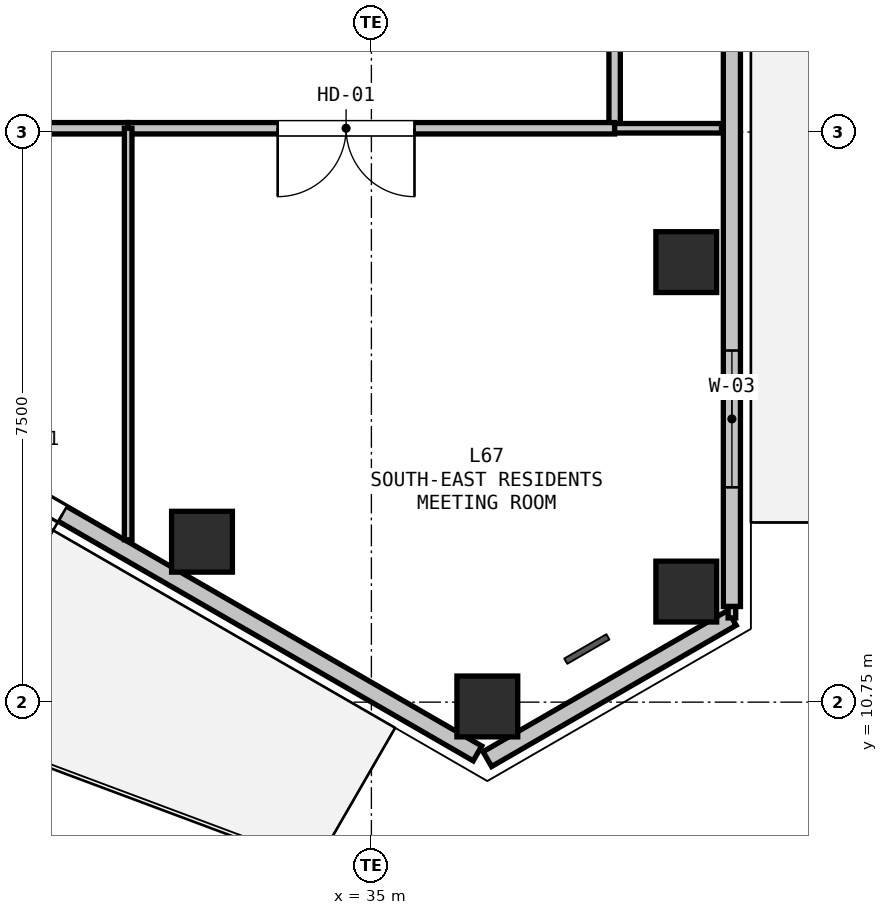
"""IFC4 building model, lengths in metres.
Left out: names, types, materials, properties, quantities, classifications, styles, units other than length and angle.
Written with IfcOpenShell. Run it as: python <this file> out.ifc"""

import sys

from ifc_helpers import new_model, si_unit, direction, frame, frame_2d, origin, origin_2d, place, context, subcontext, project, spatial, rectangle, hollow_rectangle, extrude, element, fill, save


model = new_model("IFC4")
c1 = context("Model", 3, precision=1e-05, world=origin(), true_north=direction((0.0, 1.0)))
c2 = subcontext(c1, "Body", "Model", "MODEL_VIEW")
j1 = project(units=[si_unit("LENGTHUNIT", "METRE"), si_unit("PLANEANGLEUNIT", "RADIAN")], contexts=[c1])
p1 = place(None, origin())
s1 = spatial("IfcSite", under=j1, at=p1, CompositionType="ELEMENT")
p2 = place(p1, origin())
s2 = spatial("IfcBuilding", under=s1, at=p2, CompositionType="ELEMENT")
p3 = place(p2, frame((0.0, 0.0, 239.7)))
s3 = spatial("IfcBuildingStorey", under=s2, at=p3, CompositionType="ELEMENT", Elevation=239.7)
for number, where, z_axis, x_axis in (
    (1, (39.143, 16.539, 0.0), (0.0, 0.0, 1.0), (1.0, 0.0, 0.0)),
    (2, (39.143, 12.205, 0.0), (0.0, 0.0, 1.0), (1.0, 0.0, 0.0)),
    (3, (36.525, 10.693, 0.0), (0.0, 0.0, 1.0), (1.0, 0.0, 0.0)),
    (4, (32.771, 12.861, 0.0), (0.0, 0.0, 1.0), (1.0, 0.0, 0.0)),
):
    element("IfcColumn", number, at=place(p3, frame(where, z_axis=z_axis, x_axis=x_axis)), inside=s3, PredefinedType="COLUMN", context=c2, shape_type="SweptSolid", body=[
        extrude(hollow_rectangle(XDim=0.8, YDim=0.8, WallThickness=0.025, at=origin_2d()), origin(), (0.0, 0.0, 1.0), 3.3),
    ])
p4 = place(p3, frame((39.743, 11.858, 0.0), z_axis=(0.0, 0.0, 1.0), x_axis=(-0.866038962515, -0.499976514854, 0.0)))
e5 = element("IfcWall", 5, at=p4, inside=s3, PredefinedType="SOLIDWALL", context=c2, shape_type="SweptSolid", body=[
    extrude(rectangle(XDim=3.716, YDim=0.225, at=frame_2d((1.858, 0.0))), origin(), (0.0, 0.0, 1.0), 2.7),
])
p5 = place(p3, frame((39.743, 20.936, 0.0), z_axis=(0.0, 0.0, 1.0), x_axis=(0.0, -1.0, 0.0)))
e6 = element("IfcWall", 6, at=p5, inside=s3, PredefinedType="SOLIDWALL", context=c2, shape_type="SweptSolid", body=[
    extrude(rectangle(XDim=8.928, YDim=0.225, at=frame_2d((4.464, 0.0))), origin(), (0.0, 0.0, 1.0), 2.7),
])
p6 = place(p5, frame((5.56, 0.0, 0.9)))
e7 = element("IfcOpeningElement", 7, at=p6, cuts=e6, PredefinedType="OPENING", context=c2, shape_type="SweptSolid", body=[
    extrude(rectangle(XDim=1.8, YDim=1.5, at=frame_2d((0.9, 0.75))), frame((0.0, 0.123, 0.0), z_axis=(0.0, -1.0, 0.0), x_axis=(1.0, 0.0, 0.0)), (0.0, 0.0, 1.0), 0.245),
])
p7 = place(p3, frame((36.395, 10.076, 0.0), z_axis=(0.0, 0.0, 1.0), x_axis=(-0.866026655105, 0.499997832642, 0.0)))
e8 = element("IfcWall", 8, at=p7, inside=s3, PredefinedType="SOLIDWALL", context=c2, shape_type="SweptSolid", body=[
    extrude(rectangle(XDim=8.928, YDim=0.225, at=frame_2d((4.464, 0.0))), origin(), (0.0, 0.0, 1.0), 2.7),
])
p8 = place(p7, frame((6.302, 0.0, 0.0)))
e9 = element("IfcOpeningElement", 9, at=p8, cuts=e8, PredefinedType="OPENING", context=c2, shape_type="SweptSolid", body=[
    extrude(rectangle(XDim=1.0, YDim=2.1, at=frame_2d((0.5, 1.05))), frame((0.0, 0.123, 0.0), z_axis=(0.0, -1.0, 0.0), x_axis=(1.0, 0.0, 0.0)), (0.0, 0.0, 1.0), 0.245),
])
p9 = place(p3, frame((38.2, 19.9, 0.0), z_axis=(0.0, 0.0, 1.0), x_axis=(0.0, -1.0, 0.0)))
e10 = element("IfcWall", 10, at=p9, inside=s3, PredefinedType="PARTITIONING", context=c2, shape_type="SweptSolid", body=[
    extrude(rectangle(XDim=1.6, YDim=0.15, at=frame_2d((0.8, 0.0))), origin(), (0.0, 0.0, 1.0), 3.08),
])
p10 = place(p3, frame((38.2, 18.3, 0.0), z_axis=(0.0, 0.0, 1.0), x_axis=(-1.0, 0.0, 0.0)))
e11 = element("IfcWall", 11, at=p10, inside=s3, PredefinedType="PARTITIONING", context=c2, shape_type="SweptSolid", body=[
    extrude(rectangle(XDim=6.4, YDim=0.15, at=frame_2d((3.2, 0.0))), origin(), (0.0, 0.0, 1.0), 2.528),
])
p11 = place(p10, frame((2.633, 0.0, 0.0)))
e12 = element("IfcOpeningElement", 12, at=p11, cuts=e11, PredefinedType="OPENING", context=c2, shape_type="SweptSolid", body=[
    extrude(rectangle(XDim=1.8, YDim=2.2, at=frame_2d((0.9, 1.1))), frame((0.0, 0.085, 0.0), z_axis=(0.0, -1.0, 0.0), x_axis=(1.0, 0.0, 0.0)), (0.0, 0.0, 1.0), 0.17),
])
p12 = place(p3, frame((31.8, 18.3, 0.0), z_axis=(0.0, 0.0, 1.0), x_axis=(-1.0, 0.0, 0.0)))
e13 = element("IfcWall", 13, at=p12, inside=s3, PredefinedType="PARTITIONING", context=c2, shape_type="SweptSolid", body=[
    extrude(rectangle(XDim=3.2, YDim=0.15, at=frame_2d((1.6, 0.0))), origin(), (0.0, 0.0, 1.0), 3.08),
])
p13 = place(p12, frame((1.1, 0.0, 0.0)))
e14 = element("IfcOpeningElement", 14, at=p13, cuts=e13, PredefinedType="OPENING", context=c2, shape_type="SweptSolid", body=[
    extrude(rectangle(XDim=1.0, YDim=2.15, at=frame_2d((0.5, 1.075))), frame((0.0, 0.085, 0.0), z_axis=(0.0, -1.0, 0.0), x_axis=(1.0, 0.0, 0.0)), (0.0, 0.0, 1.0), 0.17),
])
p14 = place(p3, frame((31.8, 12.886, 0.0), z_axis=(0.0, 0.0, 1.0), x_axis=(0.0, 1.0, 0.0)))
e15 = element("IfcWall", 15, at=p14, inside=s3, PredefinedType="PARTITIONING", context=c2, shape_type="SweptSolid", body=[
    extrude(rectangle(XDim=5.414, YDim=0.1, at=frame_2d((2.707, 0.0))), origin(), (0.0, 0.0, 1.0), 2.365),
])
p15 = place(p3, frame((38.2, 18.3, 0.0), z_axis=(0.0, 0.0, 1.0), x_axis=(1.0, 0.0, 0.0)))
e16 = element("IfcWall", 16, at=p15, inside=s3, PredefinedType="PARTITIONING", context=c2, shape_type="SweptSolid", body=[
    extrude(rectangle(XDim=1.406, YDim=0.125, at=frame_2d((0.703, 0.0))), origin(), (0.0, 0.0, 1.0), 2.365),
])
p16 = place(p3, frame((39.743, 12.008, 0.0), z_axis=(0.0, 0.0, 1.0), x_axis=(0.0, -1.0, 0.0)))
e17 = element("IfcWall", 17, at=p16, inside=s3, PredefinedType="PARTITIONING", context=c2, shape_type="SweptSolid", body=[
    extrude(rectangle(XDim=0.15, YDim=0.1, at=frame_2d((0.075, 0.0))), origin(), (0.0, 0.0, 1.0), 3.08),
])
p17 = place(p6, origin())
e18 = element("IfcWindow", 18, at=p17, inside=s3, PartitioningType="SINGLE_PANEL", PredefinedType="WINDOW", context=c2, shape_type="SweptSolid", body=[
    extrude(rectangle(XDim=1.8, YDim=1.5, at=frame_2d((0.9, 0.75))), frame((0.0, 0.03, 0.0), z_axis=(0.0, -1.0, 0.0), x_axis=(1.0, 0.0, 0.0)), (0.0, 0.0, 1.0), 0.06),
])
fill(e7, e18)
p18 = place(p8, origin())
e19 = element("IfcDoor", 19, at=p18, inside=s3, OperationType="SINGLE_SWING_LEFT", PredefinedType="DOOR", context=c2, shape_type="SweptSolid", body=[
    extrude(rectangle(XDim=1.0, YDim=2.1, at=frame_2d((0.5, 1.05))), frame((0.0, 0.025, 0.0), z_axis=(0.0, -1.0, 0.0), x_axis=(1.0, 0.0, 0.0)), (0.0, 0.0, 1.0), 0.05),
])
fill(e9, e19)
p19 = place(p11, origin())
e20 = element("IfcDoor", 20, at=p19, inside=s3, OperationType="DOUBLE_DOOR_SINGLE_SWING", PredefinedType="DOOR", context=c2, shape_type="SweptSolid", body=[
    extrude(rectangle(XDim=1.8, YDim=2.2, at=frame_2d((0.9, 1.1))), frame((0.0, 0.025, 0.0), z_axis=(0.0, -1.0, 0.0), x_axis=(1.0, 0.0, 0.0)), (0.0, 0.0, 1.0), 0.05),
])
fill(e12, e20)
save(model, sys.argv[1])
